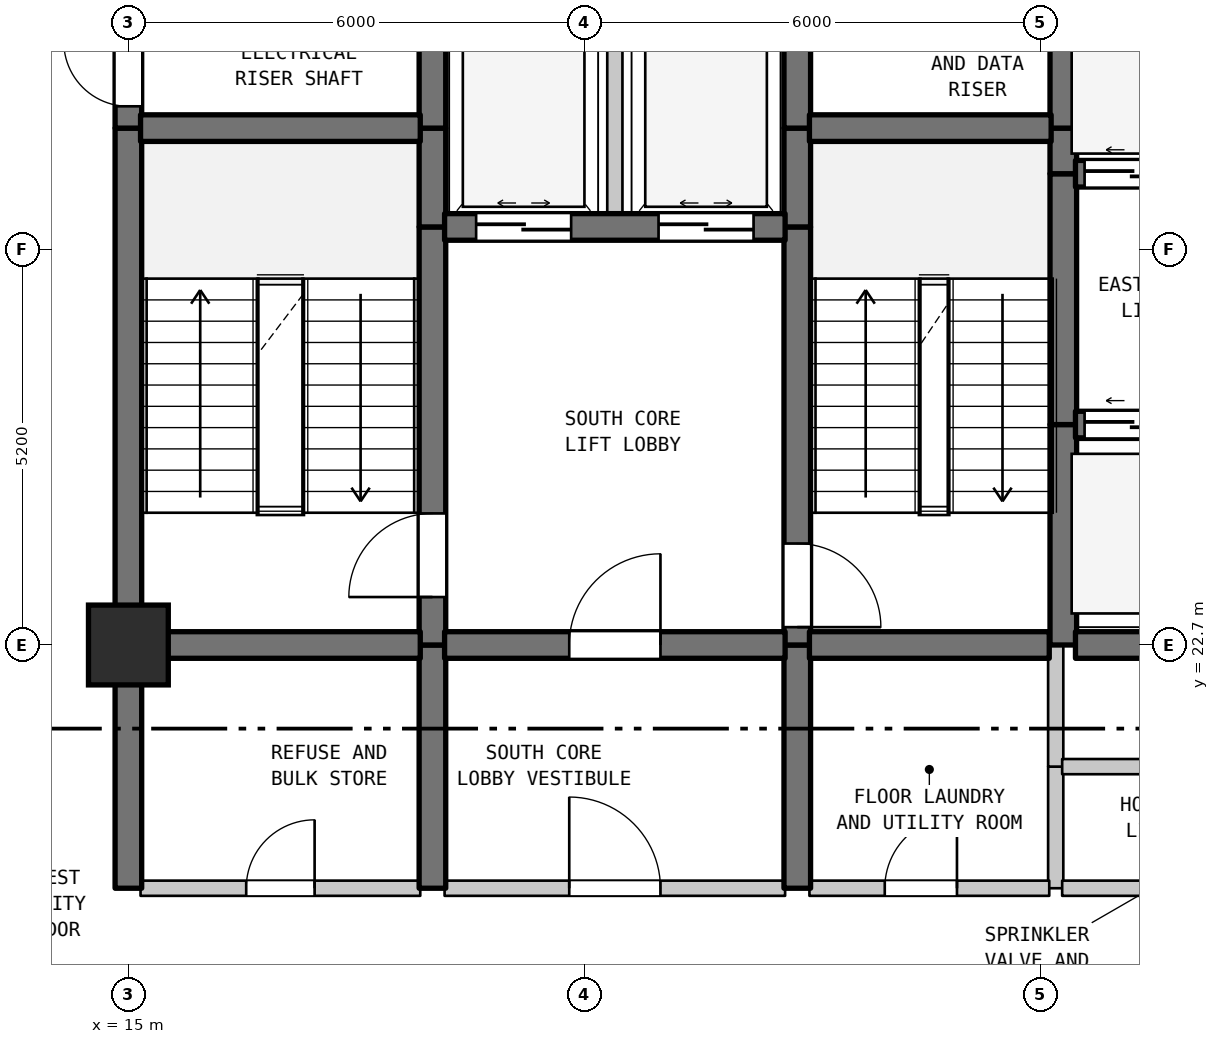
"""IFC4 building model, lengths in metres.
Left out: names, types, materials, properties, quantities, classifications, styles, units other than length and angle.
Written with IfcOpenShell. Run it as: python <this file> out.ifc"""

import sys

from ifc_helpers import new_model, si_unit, direction, frame, frame_2d, origin, origin_2d, place, context, subcontext, project, spatial, rectangle, extrude, element, fill, save


model = new_model("IFC4")
c1 = context("Model", 3, precision=1e-05, world=origin(), true_north=direction((0.0, 1.0)))
c2 = subcontext(c1, "Body", "Model", "MODEL_VIEW")
j1 = project(units=[si_unit("LENGTHUNIT", "METRE"), si_unit("PLANEANGLEUNIT", "RADIAN")], contexts=[c1])
p1 = place(None, origin())
s1 = spatial("IfcSite", under=j1, at=p1, CompositionType="ELEMENT")
p2 = place(p1, origin())
s2 = spatial("IfcBuilding", under=s1, at=p2, CompositionType="ELEMENT")
p3 = place(p2, frame((0.0, 0.0, 125.3)))
s3 = spatial("IfcBuildingStorey", under=s2, at=p3, CompositionType="ELEMENT", Elevation=125.3)
p4 = place(p3, frame((15.0, 22.7, 0.0), z_axis=(0.0, 0.0, 1.0), x_axis=(1.0, 0.0, 0.0)))
e1 = element("IfcColumn", 1, at=p4, inside=s3, PredefinedType="COLUMN", context=c2, shape_type="SweptSolid", body=[
    extrude(rectangle(XDim=1.05, YDim=1.05, at=origin_2d()), origin(), (0.0, 0.0, 1.0), 4.5),
])
p5 = place(p3, frame((15.0, 19.5, 0.0), z_axis=(0.0, 0.0, 1.0), x_axis=(0.0, 1.0, 0.0)))
e2 = element("IfcWall", 2, at=p5, inside=s3, PredefinedType="SHEAR", context=c2, shape_type="SweptSolid", body=[
    extrude(rectangle(XDim=3.2, YDim=0.35, at=frame_2d((1.6, 0.0))), origin(), (0.0, 0.0, 1.0), 4.185),
])
p6 = place(p3, frame((15.0, 22.7, 0.0), z_axis=(0.0, 0.0, 1.0), x_axis=(0.0, 1.0, 0.0)))
e3 = element("IfcWall", 3, at=p6, inside=s3, PredefinedType="SHEAR", context=c2, shape_type="SweptSolid", body=[
    extrude(rectangle(XDim=6.8, YDim=0.35, at=frame_2d((3.4, 0.0))), origin(), (0.0, 0.0, 1.0), 4.185),
])
p7 = place(p3, frame((15.0, 29.5, 0.0), z_axis=(0.0, 0.0, 1.0), x_axis=(0.0, 1.0, 0.0)))
e4 = element("IfcWall", 4, at=p7, inside=s3, PredefinedType="SHEAR", context=c2, shape_type="SweptSolid", body=[
    extrude(rectangle(XDim=1.6, YDim=0.35, at=frame_2d((0.8, 0.0))), origin(), (0.0, 0.0, 1.0), 4.185),
])
p8 = place(p7, frame((0.287, 0.0, 0.0)))
e5 = element("IfcOpeningElement", 5, at=p8, cuts=e4, PredefinedType="OPENING", context=c2, shape_type="SweptSolid", body=[
    extrude(rectangle(XDim=0.85, YDim=2.1, at=frame_2d((0.425, 1.05))), frame((0.0, 0.185, 0.0), z_axis=(0.0, -1.0, 0.0), x_axis=(1.0, 0.0, 0.0)), (0.0, 0.0, 1.0), 0.37),
])
p9 = place(p3, frame((19.0, 19.5, 0.0), z_axis=(0.0, 0.0, 1.0), x_axis=(0.0, 1.0, 0.0)))
e6 = element("IfcWall", 6, at=p9, inside=s3, PredefinedType="SHEAR", context=c2, shape_type="SweptSolid", body=[
    extrude(rectangle(XDim=3.2, YDim=0.35, at=frame_2d((1.6, 0.0))), origin(), (0.0, 0.0, 1.0), 4.185),
])
p10 = place(p3, frame((19.0, 22.7, 0.0), z_axis=(0.0, 0.0, 1.0), x_axis=(0.0, 1.0, 0.0)))
e7 = element("IfcWall", 7, at=p10, inside=s3, PredefinedType="SHEAR", context=c2, shape_type="SweptSolid", body=[
    extrude(rectangle(XDim=5.5, YDim=0.35, at=frame_2d((2.75, 0.0))), origin(), (0.0, 0.0, 1.0), 4.185),
])
p11 = place(p10, frame((0.631, 0.0, 0.0)))
e8 = element("IfcOpeningElement", 8, at=p11, cuts=e7, PredefinedType="OPENING", context=c2, shape_type="SweptSolid", body=[
    extrude(rectangle(XDim=1.1, YDim=2.15, at=frame_2d((0.55, 1.075))), frame((0.0, 0.185, 0.0), z_axis=(0.0, -1.0, 0.0), x_axis=(1.0, 0.0, 0.0)), (0.0, 0.0, 1.0), 0.37),
])
p12 = place(p3, frame((19.0, 28.2, 0.0), z_axis=(0.0, 0.0, 1.0), x_axis=(0.0, 1.0, 0.0)))
e9 = element("IfcWall", 9, at=p12, inside=s3, PredefinedType="SHEAR", context=c2, shape_type="SweptSolid", body=[
    extrude(rectangle(XDim=1.3, YDim=0.35, at=frame_2d((0.65, 0.0))), origin(), (0.0, 0.0, 1.0), 4.185),
])
p13 = place(p3, frame((19.0, 29.5, 0.0), z_axis=(0.0, 0.0, 1.0), x_axis=(0.0, 1.0, 0.0)))
e10 = element("IfcWall", 10, at=p13, inside=s3, PredefinedType="SHEAR", context=c2, shape_type="SweptSolid", body=[
    extrude(rectangle(XDim=5.5, YDim=0.35, at=frame_2d((2.75, 0.0))), origin(), (0.0, 0.0, 1.0), 4.185),
])
p14 = place(p13, frame((2.025, 0.0, 0.0)))
e11 = element("IfcOpeningElement", 11, at=p14, cuts=e10, PredefinedType="OPENING", context=c2, shape_type="SweptSolid", body=[
    extrude(rectangle(XDim=1.1, YDim=2.15, at=frame_2d((0.55, 1.075))), frame((0.0, 0.185, 0.0), z_axis=(0.0, -1.0, 0.0), x_axis=(1.0, 0.0, 0.0)), (0.0, 0.0, 1.0), 0.37),
])
p15 = place(p3, frame((21.4, 28.2, 0.0), z_axis=(0.0, 0.0, 1.0), x_axis=(0.0, 1.0, 0.0)))
e12 = element("IfcWall", 12, at=p15, inside=s3, PredefinedType="STANDARD", context=c2, shape_type="SweptSolid", body=[
    extrude(rectangle(XDim=2.6, YDim=0.2, at=frame_2d((1.3, 0.0))), origin(), (0.0, 0.0, 1.0), 4.185),
])
p16 = place(p3, frame((23.8, 19.5, 0.0), z_axis=(0.0, 0.0, 1.0), x_axis=(0.0, 1.0, 0.0)))
e13 = element("IfcWall", 13, at=p16, inside=s3, PredefinedType="SHEAR", context=c2, shape_type="SweptSolid", body=[
    extrude(rectangle(XDim=3.2, YDim=0.35, at=frame_2d((1.6, 0.0))), origin(), (0.0, 0.0, 1.0), 4.185),
])
p17 = place(p3, frame((23.8, 22.7, 0.0), z_axis=(0.0, 0.0, 1.0), x_axis=(0.0, 1.0, 0.0)))
e14 = element("IfcWall", 14, at=p17, inside=s3, PredefinedType="SHEAR", context=c2, shape_type="SweptSolid", body=[
    extrude(rectangle(XDim=5.5, YDim=0.35, at=frame_2d((2.75, 0.0))), origin(), (0.0, 0.0, 1.0), 4.185),
])
p18 = place(p17, frame((0.235, 0.0, 0.0)))
e15 = element("IfcOpeningElement", 15, at=p18, cuts=e14, PredefinedType="OPENING", context=c2, shape_type="SweptSolid", body=[
    extrude(rectangle(XDim=1.1, YDim=2.15, at=frame_2d((0.55, 1.075))), frame((0.0, 0.185, 0.0), z_axis=(0.0, -1.0, 0.0), x_axis=(1.0, 0.0, 0.0)), (0.0, 0.0, 1.0), 0.37),
])
for number, where, z_axis, x_axis in (
    (16, (23.8, 28.2, 0.0), (0.0, 0.0, 1.0), (0.0, 1.0, 0.0)),
    (17, (23.8, 29.5, 0.0), (0.0, 0.0, 1.0), (0.0, 1.0, 0.0)),
):
    element("IfcWall", number, at=place(p3, frame(where, z_axis=z_axis, x_axis=x_axis)), inside=s3, PredefinedType="SHEAR", context=c2, shape_type="SweptSolid", body=[
        extrude(rectangle(XDim=1.3, YDim=0.35, at=frame_2d((0.65, 0.0))), origin(), (0.0, 0.0, 1.0), 4.185),
    ])
p19 = place(p3, frame((27.2, 19.5, 0.0), z_axis=(0.0, 0.0, 1.0), x_axis=(0.0, 1.0, 0.0)))
e18 = element("IfcWall", 18, at=p19, inside=s3, PredefinedType="STANDARD", context=c2, shape_type="SweptSolid", body=[
    extrude(rectangle(XDim=1.6, YDim=0.2, at=frame_2d((0.8, 0.0))), origin(), (0.0, 0.0, 1.0), 4.185),
])
p20 = place(p3, frame((27.2, 21.1, 0.0), z_axis=(0.0, 0.0, 1.0), x_axis=(0.0, 1.0, 0.0)))
e19 = element("IfcWall", 19, at=p20, inside=s3, PredefinedType="STANDARD", context=c2, shape_type="SweptSolid", body=[
    extrude(rectangle(XDim=1.6, YDim=0.2, at=frame_2d((0.8, 0.0))), origin(), (0.0, 0.0, 1.0), 4.185),
])
p21 = place(p3, frame((27.3, 22.7, 0.0), z_axis=(0.0, 0.0, 1.0), x_axis=(0.0, 1.0, 0.0)))
e20 = element("IfcWall", 20, at=p21, inside=s3, PredefinedType="SHEAR", context=c2, shape_type="SweptSolid", body=[
    extrude(rectangle(XDim=2.9, YDim=0.35, at=frame_2d((1.45, 0.0))), origin(), (0.0, 0.0, 1.0), 4.185),
])
p22 = place(p3, frame((27.3, 25.6, 0.0), z_axis=(0.0, 0.0, 1.0), x_axis=(0.0, 1.0, 0.0)))
e21 = element("IfcWall", 21, at=p22, inside=s3, PredefinedType="SHEAR", context=c2, shape_type="SweptSolid", body=[
    extrude(rectangle(XDim=3.3, YDim=0.35, at=frame_2d((1.65, 0.0))), origin(), (0.0, 0.0, 1.0), 4.185),
])
p23 = place(p3, frame((27.3, 28.9, 0.0), z_axis=(0.0, 0.0, 1.0), x_axis=(0.0, 1.0, 0.0)))
e22 = element("IfcWall", 22, at=p23, inside=s3, PredefinedType="SHEAR", context=c2, shape_type="SweptSolid", body=[
    extrude(rectangle(XDim=0.6, YDim=0.35, at=frame_2d((0.3, 0.0))), origin(), (0.0, 0.0, 1.0), 4.185),
])
p24 = place(p3, frame((27.3, 29.5, 0.0), z_axis=(0.0, 0.0, 1.0), x_axis=(0.0, 1.0, 0.0)))
e23 = element("IfcWall", 23, at=p24, inside=s3, PredefinedType="SHEAR", context=c2, shape_type="SweptSolid", body=[
    extrude(rectangle(XDim=2.0, YDim=0.35, at=frame_2d((1.0, 0.0))), origin(), (0.0, 0.0, 1.0), 4.185),
])
p25 = place(p3, frame((15.16, 19.5, 0.0), z_axis=(0.0, 0.0, 1.0), x_axis=(1.0, 0.0, 0.0)))
e24 = element("IfcWall", 24, at=p25, inside=s3, PredefinedType="STANDARD", context=c2, shape_type="SweptSolid", body=[
    extrude(rectangle(XDim=3.68, YDim=0.2, at=frame_2d((1.84, 0.0))), origin(), (0.0, 0.0, 1.0), 4.185),
])
p26 = place(p25, frame((1.39, 0.0, 0.0)))
e25 = element("IfcOpeningElement", 25, at=p26, cuts=e24, PredefinedType="OPENING", context=c2, shape_type="SweptSolid", body=[
    extrude(rectangle(XDim=0.9, YDim=2.15, at=frame_2d((0.45, 1.075))), frame((0.0, 0.11, 0.0), z_axis=(0.0, -1.0, 0.0), x_axis=(1.0, 0.0, 0.0)), (0.0, 0.0, 1.0), 0.22),
])
p27 = place(p3, frame((19.16, 19.5, 0.0), z_axis=(0.0, 0.0, 1.0), x_axis=(1.0, 0.0, 0.0)))
e26 = element("IfcWall", 26, at=p27, inside=s3, PredefinedType="STANDARD", context=c2, shape_type="SweptSolid", body=[
    extrude(rectangle(XDim=4.48, YDim=0.2, at=frame_2d((2.24, 0.0))), origin(), (0.0, 0.0, 1.0), 4.185),
])
p28 = place(p27, frame((1.64, 0.0, 0.0)))
e27 = element("IfcOpeningElement", 27, at=p28, cuts=e26, PredefinedType="OPENING", context=c2, shape_type="SweptSolid", body=[
    extrude(rectangle(XDim=1.2, YDim=2.2, at=frame_2d((0.6, 1.1))), frame((0.0, 0.11, 0.0), z_axis=(0.0, -1.0, 0.0), x_axis=(1.0, 0.0, 0.0)), (0.0, 0.0, 1.0), 0.22),
])
p29 = place(p3, frame((23.96, 19.5, 0.0), z_axis=(0.0, 0.0, 1.0), x_axis=(1.0, 0.0, 0.0)))
e28 = element("IfcWall", 28, at=p29, inside=s3, PredefinedType="STANDARD", context=c2, shape_type="SweptSolid", body=[
    extrude(rectangle(XDim=3.155, YDim=0.2, at=frame_2d((1.578, 0.0))), origin(), (0.0, 0.0, 1.0), 4.185),
])
p30 = place(p29, frame((0.991, 0.0, 0.0)))
e29 = element("IfcOpeningElement", 29, at=p30, cuts=e28, PredefinedType="OPENING", context=c2, shape_type="SweptSolid", body=[
    extrude(rectangle(XDim=0.95, YDim=2.15, at=frame_2d((0.475, 1.075))), frame((0.0, 0.11, 0.0), z_axis=(0.0, -1.0, 0.0), x_axis=(1.0, 0.0, 0.0)), (0.0, 0.0, 1.0), 0.22),
])
p31 = place(p3, frame((27.285, 19.5, 0.0), z_axis=(0.0, 0.0, 1.0), x_axis=(1.0, 0.0, 0.0)))
e30 = element("IfcWall", 30, at=p31, inside=s3, PredefinedType="STANDARD", context=c2, shape_type="SweptSolid", body=[
    extrude(rectangle(XDim=3.43, YDim=0.2, at=frame_2d((1.715, 0.0))), origin(), (0.0, 0.0, 1.0), 4.185),
])
p32 = place(p31, frame((1.192, 0.0, 0.0)))
e31 = element("IfcOpeningElement", 31, at=p32, cuts=e30, PredefinedType="OPENING", context=c2, shape_type="SweptSolid", body=[
    extrude(rectangle(XDim=0.9, YDim=2.15, at=frame_2d((0.45, 1.075))), frame((0.0, 0.11, 0.0), z_axis=(0.0, -1.0, 0.0), x_axis=(1.0, 0.0, 0.0)), (0.0, 0.0, 1.0), 0.22),
])
p33 = place(p3, frame((27.285, 21.1, 0.0), z_axis=(0.0, 0.0, 1.0), x_axis=(1.0, 0.0, 0.0)))
e32 = element("IfcWall", 32, at=p33, inside=s3, PredefinedType="STANDARD", context=c2, shape_type="SweptSolid", body=[
    extrude(rectangle(XDim=3.355, YDim=0.2, at=frame_2d((1.677, 0.0))), origin(), (0.0, 0.0, 1.0), 4.185),
])
p34 = place(p3, frame((15.16, 22.7, 0.0), z_axis=(0.0, 0.0, 1.0), x_axis=(1.0, 0.0, 0.0)))
e33 = element("IfcWall", 33, at=p34, inside=s3, PredefinedType="SHEAR", context=c2, shape_type="SweptSolid", body=[
    extrude(rectangle(XDim=3.68, YDim=0.35, at=frame_2d((1.84, 0.0))), origin(), (0.0, 0.0, 1.0), 4.185),
])
p35 = place(p3, frame((19.16, 22.7, 0.0), z_axis=(0.0, 0.0, 1.0), x_axis=(1.0, 0.0, 0.0)))
e34 = element("IfcWall", 34, at=p35, inside=s3, PredefinedType="SHEAR", context=c2, shape_type="SweptSolid", body=[
    extrude(rectangle(XDim=4.48, YDim=0.35, at=frame_2d((2.24, 0.0))), origin(), (0.0, 0.0, 1.0), 4.185),
])
p36 = place(p35, frame((1.64, 0.0, 0.0)))
e35 = element("IfcOpeningElement", 35, at=p36, cuts=e34, PredefinedType="OPENING", context=c2, shape_type="SweptSolid", body=[
    extrude(rectangle(XDim=1.2, YDim=2.2, at=frame_2d((0.6, 1.1))), frame((0.0, 0.185, 0.0), z_axis=(0.0, -1.0, 0.0), x_axis=(1.0, 0.0, 0.0)), (0.0, 0.0, 1.0), 0.37),
])
p37 = place(p3, frame((23.96, 22.7, 0.0), z_axis=(0.0, 0.0, 1.0), x_axis=(1.0, 0.0, 0.0)))
e36 = element("IfcWall", 36, at=p37, inside=s3, PredefinedType="SHEAR", context=c2, shape_type="SweptSolid", body=[
    extrude(rectangle(XDim=3.155, YDim=0.35, at=frame_2d((1.578, 0.0))), origin(), (0.0, 0.0, 1.0), 4.185),
])
p38 = place(p3, frame((27.46, 22.7, 0.0), z_axis=(0.0, 0.0, 1.0), x_axis=(1.0, 0.0, 0.0)))
e37 = element("IfcWall", 37, at=p38, inside=s3, PredefinedType="SHEAR", context=c2, shape_type="SweptSolid", body=[
    extrude(rectangle(XDim=3.18, YDim=0.35, at=frame_2d((1.59, 0.0))), origin(), (0.0, 0.0, 1.0), 4.185),
])
p39 = place(p3, frame((27.46, 25.6, 0.0), z_axis=(0.0, 0.0, 1.0), x_axis=(1.0, 0.0, 0.0)))
e38 = element("IfcWall", 38, at=p39, inside=s3, PredefinedType="SHEAR", context=c2, shape_type="SweptSolid", body=[
    extrude(rectangle(XDim=3.18, YDim=0.35, at=frame_2d((1.59, 0.0))), origin(), (0.0, 0.0, 1.0), 4.185),
])
p40 = place(p39, frame((0.12, 0.0, 0.0)))
e39 = element("IfcOpeningElement", 39, at=p40, cuts=e38, PredefinedType="OPENING", context=c2, shape_type="SweptSolid", body=[
    extrude(rectangle(XDim=1.25, YDim=2.2, at=frame_2d((0.625, 1.1))), frame((0.0, 0.185, 0.0), z_axis=(0.0, -1.0, 0.0), x_axis=(1.0, 0.0, 0.0)), (0.0, 0.0, 1.0), 0.37),
])
p41 = place(p39, frame((1.81, 0.0, 0.0)))
e40 = element("IfcOpeningElement", 40, at=p41, cuts=e38, PredefinedType="OPENING", context=c2, shape_type="SweptSolid", body=[
    extrude(rectangle(XDim=1.25, YDim=2.2, at=frame_2d((0.625, 1.1))), frame((0.0, 0.185, 0.0), z_axis=(0.0, -1.0, 0.0), x_axis=(1.0, 0.0, 0.0)), (0.0, 0.0, 1.0), 0.37),
])
p42 = place(p3, frame((19.16, 28.2, 0.0), z_axis=(0.0, 0.0, 1.0), x_axis=(1.0, 0.0, 0.0)))
e41 = element("IfcWall", 41, at=p42, inside=s3, PredefinedType="SHEAR", context=c2, shape_type="SweptSolid", body=[
    extrude(rectangle(XDim=4.48, YDim=0.35, at=frame_2d((2.24, 0.0))), origin(), (0.0, 0.0, 1.0), 4.185),
])
p43 = place(p42, frame((0.415, 0.0, 0.0)))
e42 = element("IfcOpeningElement", 42, at=p43, cuts=e41, PredefinedType="OPENING", context=c2, shape_type="SweptSolid", body=[
    extrude(rectangle(XDim=1.25, YDim=2.2, at=frame_2d((0.625, 1.1))), frame((0.0, 0.185, 0.0), z_axis=(0.0, -1.0, 0.0), x_axis=(1.0, 0.0, 0.0)), (0.0, 0.0, 1.0), 0.37),
])
p44 = place(p42, frame((2.815, 0.0, 0.0)))
e43 = element("IfcOpeningElement", 43, at=p44, cuts=e41, PredefinedType="OPENING", context=c2, shape_type="SweptSolid", body=[
    extrude(rectangle(XDim=1.25, YDim=2.2, at=frame_2d((0.625, 1.1))), frame((0.0, 0.185, 0.0), z_axis=(0.0, -1.0, 0.0), x_axis=(1.0, 0.0, 0.0)), (0.0, 0.0, 1.0), 0.37),
])
p45 = place(p3, frame((27.46, 28.9, 0.0), z_axis=(0.0, 0.0, 1.0), x_axis=(1.0, 0.0, 0.0)))
e44 = element("IfcWall", 44, at=p45, inside=s3, PredefinedType="SHEAR", context=c2, shape_type="SweptSolid", body=[
    extrude(rectangle(XDim=3.18, YDim=0.35, at=frame_2d((1.59, 0.0))), origin(), (0.0, 0.0, 1.0), 4.185),
])
p46 = place(p45, frame((0.12, 0.0, 0.0)))
e45 = element("IfcOpeningElement", 45, at=p46, cuts=e44, PredefinedType="OPENING", context=c2, shape_type="SweptSolid", body=[
    extrude(rectangle(XDim=1.25, YDim=2.2, at=frame_2d((0.625, 1.1))), frame((0.0, 0.185, 0.0), z_axis=(0.0, -1.0, 0.0), x_axis=(1.0, 0.0, 0.0)), (0.0, 0.0, 1.0), 0.37),
])
p47 = place(p45, frame((1.81, 0.0, 0.0)))
e46 = element("IfcOpeningElement", 46, at=p47, cuts=e44, PredefinedType="OPENING", context=c2, shape_type="SweptSolid", body=[
    extrude(rectangle(XDim=1.25, YDim=2.2, at=frame_2d((0.625, 1.1))), frame((0.0, 0.185, 0.0), z_axis=(0.0, -1.0, 0.0), x_axis=(1.0, 0.0, 0.0)), (0.0, 0.0, 1.0), 0.37),
])
p48 = place(p3, frame((15.16, 29.5, 0.0), z_axis=(0.0, 0.0, 1.0), x_axis=(1.0, 0.0, 0.0)))
e47 = element("IfcWall", 47, at=p48, inside=s3, PredefinedType="SHEAR", context=c2, shape_type="SweptSolid", body=[
    extrude(rectangle(XDim=3.68, YDim=0.35, at=frame_2d((1.84, 0.0))), origin(), (0.0, 0.0, 1.0), 4.185),
])
p49 = place(p3, frame((23.96, 29.5, 0.0), z_axis=(0.0, 0.0, 1.0), x_axis=(1.0, 0.0, 0.0)))
e48 = element("IfcWall", 48, at=p49, inside=s3, PredefinedType="SHEAR", context=c2, shape_type="SweptSolid", body=[
    extrude(rectangle(XDim=3.18, YDim=0.35, at=frame_2d((1.59, 0.0))), origin(), (0.0, 0.0, 1.0), 4.185),
])
p50 = place(p8, origin())
e49 = element("IfcDoor", 49, at=p50, inside=s3, OperationType="SINGLE_SWING_RIGHT", PredefinedType="DOOR", context=c2, shape_type="SweptSolid", body=[
    extrude(rectangle(XDim=0.85, YDim=2.1, at=frame_2d((0.425, 1.05))), frame((0.0, 0.025, 0.0), z_axis=(0.0, -1.0, 0.0), x_axis=(1.0, 0.0, 0.0)), (0.0, 0.0, 1.0), 0.05),
])
fill(e5, e49)
p51 = place(p11, origin())
e50 = element("IfcDoor", 50, at=p51, inside=s3, OperationType="SINGLE_SWING_LEFT", PredefinedType="DOOR", context=c2, shape_type="SweptSolid", body=[
    extrude(rectangle(XDim=1.1, YDim=2.15, at=frame_2d((0.55, 1.075))), frame((0.0, 0.025, 0.0), z_axis=(0.0, -1.0, 0.0), x_axis=(1.0, 0.0, 0.0)), (0.0, 0.0, 1.0), 0.05),
])
fill(e8, e50)
p52 = place(p18, frame((1.1, 0.0, 0.0), z_axis=(0.0, 0.0, 1.0), x_axis=(-1.0, 0.0, 0.0)))
e51 = element("IfcDoor", 51, at=p52, inside=s3, OperationType="SINGLE_SWING_LEFT", PredefinedType="DOOR", context=c2, shape_type="SweptSolid", body=[
    extrude(rectangle(XDim=1.1, YDim=2.15, at=frame_2d((0.55, 1.075))), frame((0.0, 0.025, 0.0), z_axis=(0.0, -1.0, 0.0), x_axis=(1.0, 0.0, 0.0)), (0.0, 0.0, 1.0), 0.05),
])
fill(e15, e51)
p53 = place(p26, origin())
e52 = element("IfcDoor", 52, at=p53, inside=s3, OperationType="SINGLE_SWING_RIGHT", PredefinedType="DOOR", context=c2, shape_type="SweptSolid", body=[
    extrude(rectangle(XDim=0.9, YDim=2.15, at=frame_2d((0.45, 1.075))), frame((0.0, 0.025, 0.0), z_axis=(0.0, -1.0, 0.0), x_axis=(1.0, 0.0, 0.0)), (0.0, 0.0, 1.0), 0.05),
])
fill(e25, e52)
p54 = place(p28, origin())
e53 = element("IfcDoor", 53, at=p54, inside=s3, OperationType="SINGLE_SWING_LEFT", PredefinedType="DOOR", context=c2, shape_type="SweptSolid", body=[
    extrude(rectangle(XDim=1.2, YDim=2.2, at=frame_2d((0.6, 1.1))), frame((0.0, 0.025, 0.0), z_axis=(0.0, -1.0, 0.0), x_axis=(1.0, 0.0, 0.0)), (0.0, 0.0, 1.0), 0.05),
])
fill(e27, e53)
p55 = place(p30, origin())
e54 = element("IfcDoor", 54, at=p55, inside=s3, OperationType="SINGLE_SWING_RIGHT", PredefinedType="DOOR", context=c2, shape_type="SweptSolid", body=[
    extrude(rectangle(XDim=0.95, YDim=2.15, at=frame_2d((0.475, 1.075))), frame((0.0, 0.025, 0.0), z_axis=(0.0, -1.0, 0.0), x_axis=(1.0, 0.0, 0.0)), (0.0, 0.0, 1.0), 0.05),
])
fill(e29, e54)
p56 = place(p36, origin())
e55 = element("IfcDoor", 55, at=p56, inside=s3, OperationType="SINGLE_SWING_RIGHT", PredefinedType="DOOR", context=c2, shape_type="SweptSolid", body=[
    extrude(rectangle(XDim=1.2, YDim=2.2, at=frame_2d((0.6, 1.1))), frame((0.0, 0.025, 0.0), z_axis=(0.0, -1.0, 0.0), x_axis=(1.0, 0.0, 0.0)), (0.0, 0.0, 1.0), 0.05),
])
fill(e35, e55)
p57 = place(p40, origin())
e56 = element("IfcDoor", 56, at=p57, inside=s3, OperationType="DOUBLE_DOOR_SLIDING", PredefinedType="DOOR", context=c2, shape_type="SweptSolid", body=[
    extrude(rectangle(XDim=1.25, YDim=2.2, at=frame_2d((0.625, 1.1))), frame((0.0, 0.025, 0.0), z_axis=(0.0, -1.0, 0.0), x_axis=(1.0, 0.0, 0.0)), (0.0, 0.0, 1.0), 0.05),
])
fill(e39, e56)
p58 = place(p43, origin())
e57 = element("IfcDoor", 57, at=p58, inside=s3, OperationType="DOUBLE_DOOR_SLIDING", PredefinedType="DOOR", context=c2, shape_type="SweptSolid", body=[
    extrude(rectangle(XDim=1.25, YDim=2.2, at=frame_2d((0.625, 1.1))), frame((0.0, 0.025, 0.0), z_axis=(0.0, -1.0, 0.0), x_axis=(1.0, 0.0, 0.0)), (0.0, 0.0, 1.0), 0.05),
])
fill(e42, e57)
p59 = place(p44, origin())
e58 = element("IfcDoor", 58, at=p59, inside=s3, OperationType="DOUBLE_DOOR_SLIDING", PredefinedType="DOOR", context=c2, shape_type="SweptSolid", body=[
    extrude(rectangle(XDim=1.25, YDim=2.2, at=frame_2d((0.625, 1.1))), frame((0.0, 0.025, 0.0), z_axis=(0.0, -1.0, 0.0), x_axis=(1.0, 0.0, 0.0)), (0.0, 0.0, 1.0), 0.05),
])
fill(e43, e58)
p60 = place(p46, origin())
e59 = element("IfcDoor", 59, at=p60, inside=s3, OperationType="DOUBLE_DOOR_SLIDING", PredefinedType="DOOR", context=c2, shape_type="SweptSolid", body=[
    extrude(rectangle(XDim=1.25, YDim=2.2, at=frame_2d((0.625, 1.1))), frame((0.0, 0.025, 0.0), z_axis=(0.0, -1.0, 0.0), x_axis=(1.0, 0.0, 0.0)), (0.0, 0.0, 1.0), 0.05),
])
fill(e45, e59)
save(model, sys.argv[1])
